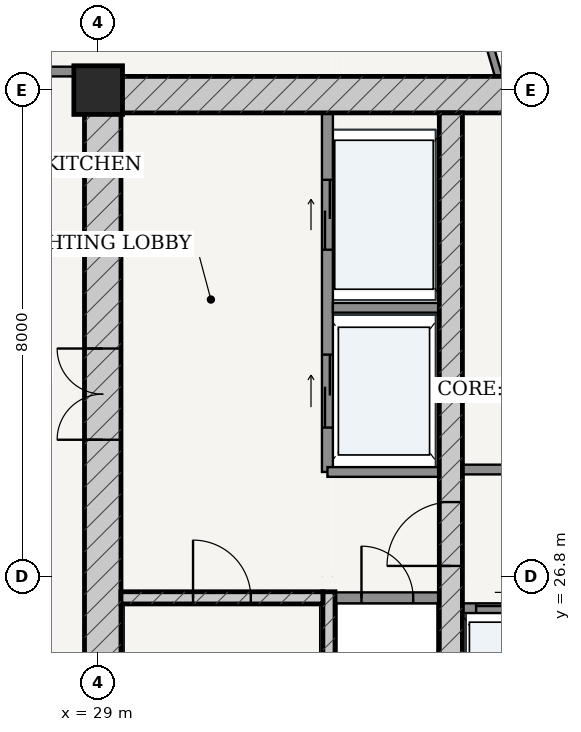
"""IFC4 building model, lengths in metres.
Left out: names, types, materials, properties, quantities, classifications, styles, units other than length and angle.
Written with IfcOpenShell. Run it as: python <this file> out.ifc"""

import sys

from ifc_helpers import new_model, si_unit, direction, frame, frame_2d, origin, origin_2d, place, context, subcontext, project, spatial, rectangle, extrude, source, transform, mapped, element, fill, save


model = new_model("IFC4")
c1 = context("Model", 3, precision=1e-05, world=origin(), true_north=direction((-0.2419218956, 0.970295726276)))
c2 = subcontext(c1, "Body", "Model", "MODEL_VIEW")
j1 = project(units=[si_unit("LENGTHUNIT", "METRE"), si_unit("PLANEANGLEUNIT", "RADIAN")], contexts=[c1])
p1 = place(None, origin())
s1 = spatial("IfcSite", under=j1, at=p1, CompositionType="ELEMENT")
p2 = place(p1, origin())
s2 = spatial("IfcBuilding", under=s1, at=p2, CompositionType="ELEMENT")
p3 = place(p2, frame((0.0, 0.0, 228.2)))
s3 = spatial("IfcBuildingStorey", under=s2, at=p3, CompositionType="ELEMENT", Elevation=228.2)
p4 = place(p3, frame((29.0, 34.8, 0.0), z_axis=(0.0, 0.0, 1.0), x_axis=(1.0, 0.0, 0.0)))
e1 = element("IfcColumn", 1, at=p4, inside=s3, PredefinedType="COLUMN", context=c2, shape_type="SweptSolid", body=[
    extrude(rectangle(XDim=0.8, YDim=0.8, at=origin_2d()), origin(), (0.0, 0.0, 1.0), 3.7),
])
p5 = place(p3, frame((28.775, 34.725, 0.0), z_axis=(0.0, 0.0, 1.0), x_axis=(1.0, 0.0, 0.0)))
e2 = element("IfcWall", 2, at=p5, inside=s3, PredefinedType="SHEAR", context=c2, shape_type="SweptSolid", body=[
    extrude(rectangle(XDim=18.45, YDim=0.6, at=frame_2d((9.225, 0.0))), origin(), (0.0, 0.0, 1.0), 3.435),
])
p6 = place(p3, frame((29.075, 19.175, 0.0), z_axis=(0.0, 0.0, 1.0), x_axis=(0.0, 1.0, 0.0)))
e3 = element("IfcWall", 3, at=p6, inside=s3, PredefinedType="SHEAR", context=c2, shape_type="SweptSolid", body=[
    extrude(rectangle(XDim=15.25, YDim=0.6, at=frame_2d((7.625, 0.0))), origin(), (0.0, 0.0, 1.0), 3.435),
])
p7 = place(p6, frame((9.875, 0.0, 0.0)))
e4 = element("IfcOpeningElement", 4, at=p7, cuts=e3, PredefinedType="OPENING", context=c2, shape_type="SweptSolid", body=[
    extrude(rectangle(XDim=1.5, YDim=2.2, at=frame_2d((0.75, 1.1))), frame((0.0, 0.31, 0.0), z_axis=(0.0, -1.0, 0.0), x_axis=(1.0, 0.0, 0.0)), (0.0, 0.0, 1.0), 0.62),
])
p8 = place(p3, frame((32.795, 19.175, 0.0), z_axis=(0.0, 0.0, 1.0), x_axis=(0.0, 1.0, 0.0)))
e5 = element("IfcWall", 5, at=p8, inside=s3, PredefinedType="SOLIDWALL", context=c2, shape_type="SweptSolid", body=[
    extrude(rectangle(XDim=7.375, YDim=0.2, at=frame_2d((3.688, 0.0))), origin(), (0.0, 0.0, 1.0), 3.435),
])
p9 = place(p3, frame((29.375, 26.45, 0.0), z_axis=(0.0, 0.0, 1.0), x_axis=(1.0, 0.0, 0.0)))
e6 = element("IfcWall", 6, at=p9, inside=s3, PredefinedType="SOLIDWALL", context=c2, shape_type="SweptSolid", body=[
    extrude(rectangle(XDim=3.32, YDim=0.2, at=frame_2d((1.66, 0.0))), origin(), (0.0, 0.0, 1.0), 3.435),
])
p10 = place(p9, frame((1.185, 0.0, 0.0)))
e7 = element("IfcOpeningElement", 7, at=p10, cuts=e6, PredefinedType="OPENING", context=c2, shape_type="SweptSolid", body=[
    extrude(rectangle(XDim=0.95, YDim=2.15, at=frame_2d((0.475, 1.075))), frame((0.0, 0.11, 0.0), z_axis=(0.0, -1.0, 0.0), x_axis=(1.0, 0.0, 0.0)), (0.0, 0.0, 1.0), 0.22),
])
p11 = place(p3, frame((34.8, 19.175, 0.0), z_axis=(0.0, 0.0, 1.0), x_axis=(0.0, 1.0, 0.0)))
e8 = element("IfcWall", 8, at=p11, inside=s3, PredefinedType="SHEAR", context=c2, shape_type="SweptSolid", body=[
    extrude(rectangle(XDim=15.25, YDim=0.38, at=frame_2d((7.625, 0.0))), origin(), (0.0, 0.0, 1.0), 3.435),
])
p12 = place(p11, frame((7.8, 0.0, 0.0)))
e9 = element("IfcOpeningElement", 9, at=p12, cuts=e8, PredefinedType="OPENING", context=c2, shape_type="SweptSolid", body=[
    extrude(rectangle(XDim=1.05, YDim=2.15, at=frame_2d((0.525, 1.075))), frame((0.0, 0.2, 0.0), z_axis=(0.0, -1.0, 0.0), x_axis=(1.0, 0.0, 0.0)), (0.0, 0.0, 1.0), 0.4),
])
p13 = place(p3, frame((32.9, 26.45, 0.0), z_axis=(0.0, 0.0, 1.0), x_axis=(1.0, 0.0, 0.0)))
e10 = element("IfcWall", 10, at=p13, inside=s3, PredefinedType="PARTITIONING", context=c2, shape_type="SweptSolid", body=[
    extrude(rectangle(XDim=1.71, YDim=0.18, at=frame_2d((0.855, 0.0))), origin(), (0.0, 0.0, 1.0), 3.435),
])
p14 = place(p13, frame((0.43, 0.0, 0.0)))
e11 = element("IfcOpeningElement", 11, at=p14, cuts=e10, PredefinedType="OPENING", context=c2, shape_type="SweptSolid", body=[
    extrude(rectangle(XDim=0.85, YDim=2.1, at=frame_2d((0.425, 1.05))), frame((0.0, 0.1, 0.0), z_axis=(0.0, -1.0, 0.0), x_axis=(1.0, 0.0, 0.0)), (0.0, 0.0, 1.0), 0.2),
])
p15 = place(p3, frame((32.77, 28.52, 0.0), z_axis=(0.0, 0.0, 1.0), x_axis=(0.0, 1.0, 0.0)))
e12 = element("IfcWall", 12, at=p15, inside=s3, PredefinedType="PARTITIONING", context=c2, shape_type="SweptSolid", body=[
    extrude(rectangle(XDim=5.905, YDim=0.18, at=frame_2d((2.953, 0.0))), origin(), (0.0, 0.0, 1.0), 3.435),
])
p16 = place(p15, frame((3.655, 0.0, 0.0)))
e13 = element("IfcOpeningElement", 13, at=p16, cuts=e12, PredefinedType="OPENING", context=c2, shape_type="SweptSolid", body=[
    extrude(rectangle(XDim=1.15, YDim=2.2, at=frame_2d((0.575, 1.1))), frame((0.0, 0.1, 0.0), z_axis=(0.0, -1.0, 0.0), x_axis=(1.0, 0.0, 0.0)), (0.0, 0.0, 1.0), 0.2),
])
p17 = place(p15, frame((0.73, 0.0, 0.0)))
e14 = element("IfcOpeningElement", 14, at=p17, cuts=e12, PredefinedType="OPENING", context=c2, shape_type="SweptSolid", body=[
    extrude(rectangle(XDim=1.2, YDim=2.25, at=frame_2d((0.6, 1.125))), frame((0.0, 0.1, 0.0), z_axis=(0.0, -1.0, 0.0), x_axis=(1.0, 0.0, 0.0)), (0.0, 0.0, 1.0), 0.2),
])
p18 = place(p3, frame((32.86, 31.22, 0.0), z_axis=(0.0, 0.0, 1.0), x_axis=(1.0, 0.0, 0.0)))
e15 = element("IfcWall", 15, at=p18, inside=s3, PredefinedType="PARTITIONING", context=c2, shape_type="SweptSolid", body=[
    extrude(rectangle(XDim=1.75, YDim=0.16, at=frame_2d((0.875, 0.0))), origin(), (0.0, 0.0, 1.0), 3.435),
])
p19 = place(p3, frame((32.77, 28.52, 0.0), z_axis=(0.0, 0.0, 1.0), x_axis=(1.0, 0.0, 0.0)))
e16 = element("IfcWall", 16, at=p19, inside=s3, PredefinedType="PARTITIONING", context=c2, shape_type="SweptSolid", body=[
    extrude(rectangle(XDim=1.84, YDim=0.16, at=frame_2d((0.92, 0.0))), origin(), (0.0, 0.0, 1.0), 3.435),
])
p20 = place(p3, frame((34.99, 28.56, 0.0), z_axis=(0.0, 0.0, 1.0), x_axis=(1.0, 0.0, 0.0)))
e17 = element("IfcWall", 17, at=p20, inside=s3, PredefinedType="PARTITIONING", context=c2, shape_type="SweptSolid", body=[
    extrude(rectangle(XDim=6.02, YDim=0.16, at=frame_2d((3.01, 0.0))), origin(), (0.0, 0.0, 1.0), 3.435),
])
p21 = place(p20, frame((2.585, 0.0, 0.0)))
e18 = element("IfcOpeningElement", 18, at=p21, cuts=e17, PredefinedType="OPENING", context=c2, shape_type="SweptSolid", body=[
    extrude(rectangle(XDim=0.85, YDim=2.1, at=frame_2d((0.425, 1.05))), frame((0.0, 0.09, 0.0), z_axis=(0.0, -1.0, 0.0), x_axis=(1.0, 0.0, 0.0)), (0.0, 0.0, 1.0), 0.18),
])
p22 = place(p3, frame((34.99, 26.28, 0.0), z_axis=(0.0, 0.0, 1.0), x_axis=(1.0, 0.0, 0.0)))
e19 = element("IfcWall", 19, at=p22, inside=s3, PredefinedType="PARTITIONING", context=c2, shape_type="SweptSolid", body=[
    extrude(rectangle(XDim=6.02, YDim=0.16, at=frame_2d((3.01, 0.0))), origin(), (0.0, 0.0, 1.0), 3.435),
])
p23 = place(p22, frame((0.225, 0.0, 0.0)))
e20 = element("IfcOpeningElement", 20, at=p23, cuts=e19, PredefinedType="OPENING", context=c2, shape_type="SweptSolid", body=[
    extrude(rectangle(XDim=1.1, YDim=2.2, at=frame_2d((0.55, 1.1))), frame((0.0, 0.09, 0.0), z_axis=(0.0, -1.0, 0.0), x_axis=(1.0, 0.0, 0.0)), (0.0, 0.0, 1.0), 0.18),
])
p24 = place(p22, frame((1.705, 0.0, 0.0)))
e21 = element("IfcOpeningElement", 21, at=p24, cuts=e19, PredefinedType="OPENING", context=c2, shape_type="SweptSolid", body=[
    extrude(rectangle(XDim=1.1, YDim=2.2, at=frame_2d((0.55, 1.1))), frame((0.0, 0.09, 0.0), z_axis=(0.0, -1.0, 0.0), x_axis=(1.0, 0.0, 0.0)), (0.0, 0.0, 1.0), 0.18),
])
p25 = place(p3, frame((26.845, 35.105, 0.0), z_axis=(0.0, 0.0, 1.0), x_axis=(1.0, 0.0, 0.0)))
e22 = element("IfcWall", 22, at=p25, inside=s3, PredefinedType="PARTITIONING", context=c2, shape_type="SweptSolid", body=[
    extrude(rectangle(XDim=1.93, YDim=0.16, at=frame_2d((0.965, 0.0))), origin(), (0.0, 0.0, 1.0), 3.435),
])
p26 = place(p25, frame((0.37, 0.0, 0.0)))
e23 = element("IfcOpeningElement", 23, at=p26, cuts=e22, PredefinedType="OPENING", context=c2, shape_type="SweptSolid", body=[
    extrude(rectangle(XDim=0.98, YDim=2.2, at=frame_2d((0.49, 1.1))), frame((0.0, 0.09, 0.0), z_axis=(0.0, -1.0, 0.0), x_axis=(1.0, 0.0, 0.0)), (0.0, 0.0, 1.0), 0.18),
])
p27 = place(p3, frame((35.586, 35.027, 0.0), z_axis=(0.0, 0.0, 1.0), x_axis=(-0.281539118681, 0.959549751004, 0.0)))
e24 = element("IfcWall", 24, at=p27, inside=s3, PredefinedType="PARTITIONING", context=c2, shape_type="SweptSolid", body=[
    extrude(rectangle(XDim=2.698, YDim=0.12, at=frame_2d((1.349, 0.0))), origin(), (0.0, 0.0, 1.0), 2.52),
])
p28 = place(p27, frame((0.919, 0.0, 0.0)))
e25 = element("IfcOpeningElement", 25, at=p28, cuts=e24, PredefinedType="OPENING", context=c2, shape_type="SweptSolid", body=[
    extrude(rectangle(XDim=0.86, YDim=2.15, at=frame_2d((0.43, 1.075))), frame((0.0, 0.07, 0.0), z_axis=(0.0, -1.0, 0.0), x_axis=(1.0, 0.0, 0.0)), (0.0, 0.0, 1.0), 0.14),
])
m1 = source(origin(), c2, "Body", "SweptSolid", [
    extrude(rectangle(XDim=1.5, YDim=2.2, at=frame_2d((0.75, 1.1))), frame((0.0, 0.025, 0.0), z_axis=(0.0, -1.0, 0.0), x_axis=(1.0, 0.0, 0.0)), (0.0, 0.0, 1.0), 0.05),
])
p29 = place(p7, origin())
e26 = element("IfcDoor", 26, at=p29, inside=s3, OperationType="DOUBLE_DOOR_SINGLE_SWING", PredefinedType="DOOR", context=c2, shape_type="MappedRepresentation", body=[
    mapped(m1, transform((0.0, 0.0, 0.0), scale=1.0)),
])
fill(e4, e26)
m2 = source(origin(), c2, "Body", "SweptSolid", [
    extrude(rectangle(XDim=1.05, YDim=2.15, at=frame_2d((0.525, 1.075))), frame((0.0, 0.025, 0.0), z_axis=(0.0, -1.0, 0.0), x_axis=(1.0, 0.0, 0.0)), (0.0, 0.0, 1.0), 0.05),
])
p30 = place(p12, origin())
e27 = element("IfcDoor", 27, at=p30, inside=s3, OperationType="SINGLE_SWING_LEFT", PredefinedType="DOOR", context=c2, shape_type="MappedRepresentation", body=[
    mapped(m2, transform((0.0, 0.0, 0.0), scale=1.0)),
])
fill(e9, e27)
m3 = source(origin(), c2, "Body", "SweptSolid", [
    extrude(rectangle(XDim=0.95, YDim=2.15, at=frame_2d((0.475, 1.075))), frame((0.0, 0.025, 0.0), z_axis=(0.0, -1.0, 0.0), x_axis=(1.0, 0.0, 0.0)), (0.0, 0.0, 1.0), 0.05),
])
p31 = place(p10, origin())
e28 = element("IfcDoor", 28, at=p31, inside=s3, OperationType="SINGLE_SWING_LEFT", PredefinedType="DOOR", context=c2, shape_type="MappedRepresentation", body=[
    mapped(m3, transform((0.0, 0.0, 0.0), scale=1.0)),
])
fill(e7, e28)
m4 = source(origin(), c2, "Body", "SweptSolid", [
    extrude(rectangle(XDim=0.85, YDim=2.1, at=frame_2d((0.425, 1.05))), frame((0.0, 0.025, 0.0), z_axis=(0.0, -1.0, 0.0), x_axis=(1.0, 0.0, 0.0)), (0.0, 0.0, 1.0), 0.05),
])
p32 = place(p14, origin())
e29 = element("IfcDoor", 29, at=p32, inside=s3, OperationType="SINGLE_SWING_LEFT", PredefinedType="DOOR", context=c2, shape_type="MappedRepresentation", body=[
    mapped(m4, transform((0.0, 0.0, 0.0), scale=1.0)),
])
fill(e11, e29)
m5 = source(origin(), c2, "Body", "SweptSolid", [
    extrude(rectangle(XDim=1.15, YDim=2.2, at=frame_2d((0.575, 1.1))), frame((0.0, 0.025, 0.0), z_axis=(0.0, -1.0, 0.0), x_axis=(1.0, 0.0, 0.0)), (0.0, 0.0, 1.0), 0.05),
])
p33 = place(p16, origin())
e30 = element("IfcDoor", 30, at=p33, inside=s3, OperationType="DOUBLE_DOOR_SLIDING", PredefinedType="DOOR", context=c2, shape_type="MappedRepresentation", body=[
    mapped(m5, transform((0.0, 0.0, 0.0), scale=1.0)),
])
fill(e13, e30)
m6 = source(origin(), c2, "Body", "SweptSolid", [
    extrude(rectangle(XDim=1.2, YDim=2.25, at=frame_2d((0.6, 1.125))), frame((0.0, 0.025, 0.0), z_axis=(0.0, -1.0, 0.0), x_axis=(1.0, 0.0, 0.0)), (0.0, 0.0, 1.0), 0.05),
])
p34 = place(p17, origin())
e31 = element("IfcDoor", 31, at=p34, inside=s3, OperationType="DOUBLE_DOOR_SLIDING", PredefinedType="DOOR", context=c2, shape_type="MappedRepresentation", body=[
    mapped(m6, transform((0.0, 0.0, 0.0), scale=1.0)),
])
fill(e14, e31)
m7 = source(origin(), c2, "Body", "SweptSolid", [
    extrude(rectangle(XDim=1.1, YDim=2.2, at=frame_2d((0.55, 1.1))), frame((0.0, 0.025, 0.0), z_axis=(0.0, -1.0, 0.0), x_axis=(1.0, 0.0, 0.0)), (0.0, 0.0, 1.0), 0.05),
])
p35 = place(p23, origin())
e32 = element("IfcDoor", 32, at=p35, inside=s3, OperationType="DOUBLE_DOOR_SLIDING", PredefinedType="DOOR", context=c2, shape_type="MappedRepresentation", body=[
    mapped(m7, transform((0.0, 0.0, 0.0), scale=1.0)),
])
fill(e20, e32)
save(model, sys.argv[1])
